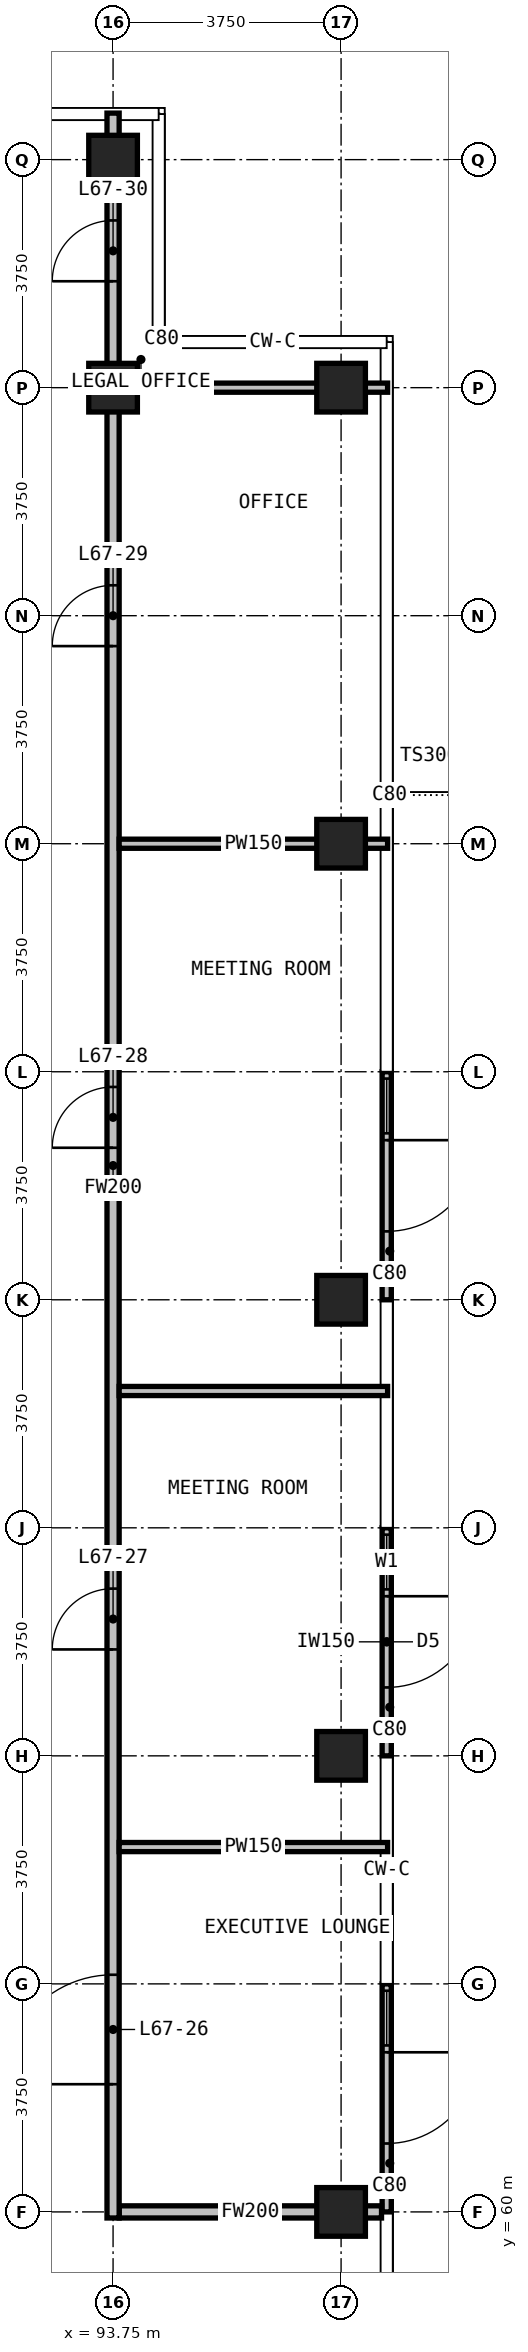
"""IFC4 building model, lengths in metres.
Left out: names, types, materials, properties, quantities, classifications, styles, units other than length and angle.
Written with IfcOpenShell. Run it as: python <this file> out.ifc"""

import sys

from ifc_helpers import new_model, si_unit, direction, frame, frame_2d, origin, origin_2d, place, context, subcontext, project, spatial, rectangle, extrude, element, fill, save


model = new_model("IFC4")
c1 = context("Model", 3, precision=1e-05, world=origin(), true_north=direction((0.0, 1.0)))
c2 = subcontext(c1, "Body", "Model", "MODEL_VIEW")
j1 = project(units=[si_unit("LENGTHUNIT", "METRE"), si_unit("PLANEANGLEUNIT", "RADIAN")], contexts=[c1])
p1 = place(None, origin())
s1 = spatial("IfcSite", under=j1, at=p1, CompositionType="ELEMENT")
p2 = place(p1, origin())
s2 = spatial("IfcBuilding", under=s1, at=p2, CompositionType="ELEMENT")
p3 = place(p2, frame((0.0, 0.0, 258.5)))
s3 = spatial("IfcBuildingStorey", under=s2, at=p3, CompositionType="ELEMENT", Elevation=258.5)
for number, where, z_axis, x_axis in (
    (1, (93.75, 90.0, 0.0), (0.0, 0.0, 1.0), (1.0, 0.0, 0.0)),
    (2, (93.75, 93.75, 0.0), (0.0, 0.0, 1.0), (1.0, 0.0, 0.0)),
    (3, (97.5, 60.0, 0.0), (0.0, 0.0, 1.0), (1.0, 0.0, 0.0)),
    (4, (97.5, 67.5, 0.0), (0.0, 0.0, 1.0), (1.0, 0.0, 0.0)),
    (5, (97.5, 75.0, 0.0), (0.0, 0.0, 1.0), (1.0, 0.0, 0.0)),
    (6, (97.5, 82.5, 0.0), (0.0, 0.0, 1.0), (1.0, 0.0, 0.0)),
    (7, (97.5, 90.0, 0.0), (0.0, 0.0, 1.0), (1.0, 0.0, 0.0)),
):
    element("IfcColumn", number, at=place(p3, frame(where, z_axis=z_axis, x_axis=x_axis)), inside=s3, PredefinedType="COLUMN", context=c2, shape_type="SweptSolid", body=[
        extrude(rectangle(XDim=0.8, YDim=0.8, at=origin_2d()), origin(), (0.0, 0.0, 1.0), 3.6),
    ])
p4 = place(p3, frame((98.25, 63.75, 0.0), z_axis=(0.0, 0.0, 1.0), x_axis=(0.0, -1.0, 0.0)))
e8 = element("IfcWall", 8, at=p4, inside=s3, PredefinedType="SOLIDWALL", context=c2, shape_type="SweptSolid", body=[
    extrude(rectangle(XDim=3.75, YDim=0.15, at=frame_2d((1.875, 0.0))), origin(), (0.0, 0.0, 1.0), 3.3),
])
p5 = place(p4, frame((0.113, 0.0, 0.1)))
e9 = element("IfcOpeningElement", 9, at=p5, cuts=e8, PredefinedType="OPENING", context=c2, shape_type="SweptSolid", body=[
    extrude(rectangle(XDim=0.9, YDim=2.4, at=frame_2d((0.45, 1.2))), frame((0.0, 0.085, 0.0), z_axis=(0.0, -1.0, 0.0), x_axis=(1.0, 0.0, 0.0)), (0.0, 0.0, 1.0), 0.17),
])
p6 = place(p4, frame((1.125, 0.0, 0.0)))
e10 = element("IfcOpeningElement", 10, at=p6, cuts=e8, PredefinedType="OPENING", context=c2, shape_type="SweptSolid", body=[
    extrude(rectangle(XDim=1.5, YDim=2.4, at=frame_2d((0.75, 1.2))), frame((0.0, 0.085, 0.0), z_axis=(0.0, -1.0, 0.0), x_axis=(1.0, 0.0, 0.0)), (0.0, 0.0, 1.0), 0.17),
])
p7 = place(p3, frame((98.25, 71.25, 0.0), z_axis=(0.0, 0.0, 1.0), x_axis=(0.0, -1.0, 0.0)))
e11 = element("IfcWall", 11, at=p7, inside=s3, PredefinedType="SOLIDWALL", context=c2, shape_type="SweptSolid", body=[
    extrude(rectangle(XDim=3.75, YDim=0.15, at=frame_2d((1.875, 0.0))), origin(), (0.0, 0.0, 1.0), 3.3),
])
p8 = place(p7, frame((0.113, 0.0, 0.1)))
e12 = element("IfcOpeningElement", 12, at=p8, cuts=e11, PredefinedType="OPENING", context=c2, shape_type="SweptSolid", body=[
    extrude(rectangle(XDim=0.9, YDim=2.4, at=frame_2d((0.45, 1.2))), frame((0.0, 0.085, 0.0), z_axis=(0.0, -1.0, 0.0), x_axis=(1.0, 0.0, 0.0)), (0.0, 0.0, 1.0), 0.17),
])
p9 = place(p7, frame((1.125, 0.0, 0.0)))
e13 = element("IfcOpeningElement", 13, at=p9, cuts=e11, PredefinedType="OPENING", context=c2, shape_type="SweptSolid", body=[
    extrude(rectangle(XDim=1.5, YDim=2.4, at=frame_2d((0.75, 1.2))), frame((0.0, 0.085, 0.0), z_axis=(0.0, -1.0, 0.0), x_axis=(1.0, 0.0, 0.0)), (0.0, 0.0, 1.0), 0.17),
])
p10 = place(p3, frame((98.25, 78.75, 0.0), z_axis=(0.0, 0.0, 1.0), x_axis=(0.0, -1.0, 0.0)))
e14 = element("IfcWall", 14, at=p10, inside=s3, PredefinedType="SOLIDWALL", context=c2, shape_type="SweptSolid", body=[
    extrude(rectangle(XDim=3.75, YDim=0.15, at=frame_2d((1.875, 0.0))), origin(), (0.0, 0.0, 1.0), 3.3),
])
p11 = place(p10, frame((0.113, 0.0, 0.1)))
e15 = element("IfcOpeningElement", 15, at=p11, cuts=e14, PredefinedType="OPENING", context=c2, shape_type="SweptSolid", body=[
    extrude(rectangle(XDim=0.9, YDim=2.4, at=frame_2d((0.45, 1.2))), frame((0.0, 0.085, 0.0), z_axis=(0.0, -1.0, 0.0), x_axis=(1.0, 0.0, 0.0)), (0.0, 0.0, 1.0), 0.17),
])
p12 = place(p10, frame((1.125, 0.0, 0.0)))
e16 = element("IfcOpeningElement", 16, at=p12, cuts=e14, PredefinedType="OPENING", context=c2, shape_type="SweptSolid", body=[
    extrude(rectangle(XDim=1.5, YDim=2.4, at=frame_2d((0.75, 1.2))), frame((0.0, 0.085, 0.0), z_axis=(0.0, -1.0, 0.0), x_axis=(1.0, 0.0, 0.0)), (0.0, 0.0, 1.0), 0.17),
])
p13 = place(p3, frame((93.85, 60.0, 0.0), z_axis=(0.0, 0.0, 1.0), x_axis=(1.0, 0.0, 0.0)))
e17 = element("IfcWall", 17, at=p13, inside=s3, PredefinedType="PARTITIONING", context=c2, shape_type="SweptSolid", body=[
    extrude(rectangle(XDim=4.315, YDim=0.2, at=frame_2d((2.157, 0.0))), origin(), (0.0, 0.0, 1.0), 3.3),
])
p14 = place(p3, frame((93.75, 59.9, 0.0), z_axis=(0.0, 0.0, 1.0), x_axis=(0.0, 1.0, 0.0)))
e18 = element("IfcWall", 18, at=p14, inside=s3, PredefinedType="PARTITIONING", context=c2, shape_type="SweptSolid", body=[
    extrude(rectangle(XDim=34.615, YDim=0.2, at=frame_2d((17.308, 0.0))), origin(), (0.0, 0.0, 1.0), 3.3),
])
p15 = place(p14, frame((2.2, 0.0, 0.0)))
e19 = element("IfcOpeningElement", 19, at=p15, cuts=e18, PredefinedType="OPENING", context=c2, shape_type="SweptSolid", body=[
    extrude(rectangle(XDim=1.8, YDim=2.2, at=frame_2d((0.9, 1.1))), frame((0.0, 0.11, 0.0), z_axis=(0.0, -1.0, 0.0), x_axis=(1.0, 0.0, 0.0)), (0.0, 0.0, 1.0), 0.22),
])
p16 = place(p14, frame((9.35, 0.0, 0.0)))
e20 = element("IfcOpeningElement", 20, at=p16, cuts=e18, PredefinedType="OPENING", context=c2, shape_type="SweptSolid", body=[
    extrude(rectangle(XDim=1.0, YDim=2.2, at=frame_2d((0.5, 1.1))), frame((0.0, 0.11, 0.0), z_axis=(0.0, -1.0, 0.0), x_axis=(1.0, 0.0, 0.0)), (0.0, 0.0, 1.0), 0.22),
])
p17 = place(p14, frame((17.6, 0.0, 0.0)))
e21 = element("IfcOpeningElement", 21, at=p17, cuts=e18, PredefinedType="OPENING", context=c2, shape_type="SweptSolid", body=[
    extrude(rectangle(XDim=1.0, YDim=2.2, at=frame_2d((0.5, 1.1))), frame((0.0, 0.11, 0.0), z_axis=(0.0, -1.0, 0.0), x_axis=(1.0, 0.0, 0.0)), (0.0, 0.0, 1.0), 0.22),
])
p18 = place(p14, frame((25.85, 0.0, 0.0)))
e22 = element("IfcOpeningElement", 22, at=p18, cuts=e18, PredefinedType="OPENING", context=c2, shape_type="SweptSolid", body=[
    extrude(rectangle(XDim=1.0, YDim=2.2, at=frame_2d((0.5, 1.1))), frame((0.0, 0.11, 0.0), z_axis=(0.0, -1.0, 0.0), x_axis=(1.0, 0.0, 0.0)), (0.0, 0.0, 1.0), 0.22),
])
p19 = place(p14, frame((31.85, 0.0, 0.0)))
e23 = element("IfcOpeningElement", 23, at=p19, cuts=e18, PredefinedType="OPENING", context=c2, shape_type="SweptSolid", body=[
    extrude(rectangle(XDim=1.0, YDim=2.2, at=frame_2d((0.5, 1.1))), frame((0.0, 0.11, 0.0), z_axis=(0.0, -1.0, 0.0), x_axis=(1.0, 0.0, 0.0)), (0.0, 0.0, 1.0), 0.22),
])
for number, where, z_axis, x_axis in (
    (24, (93.85, 66.0, 0.0), (0.0, 0.0, 1.0), (1.0, 0.0, 0.0)),
    (25, (93.85, 73.5, 0.0), (0.0, 0.0, 1.0), (1.0, 0.0, 0.0)),
    (26, (93.85, 82.5, 0.0), (0.0, 0.0, 1.0), (1.0, 0.0, 0.0)),
    (27, (93.85, 90.0, 0.0), (0.0, 0.0, 1.0), (1.0, 0.0, 0.0)),
):
    element("IfcWall", number, at=place(p3, frame(where, z_axis=z_axis, x_axis=x_axis)), inside=s3, PredefinedType="PARTITIONING", context=c2, shape_type="SweptSolid", body=[
        extrude(rectangle(XDim=4.415, YDim=0.15, at=frame_2d((2.208, 0.0))), origin(), (0.0, 0.0, 1.0), 3.3),
    ])
p20 = place(p5, origin())
e28 = element("IfcWindow", 28, at=p20, inside=s3, PartitioningType="SINGLE_PANEL", PredefinedType="WINDOW", context=c2, shape_type="SweptSolid", body=[
    extrude(rectangle(XDim=0.9, YDim=2.4, at=frame_2d((0.45, 1.2))), frame((0.0, 0.03, 0.0), z_axis=(0.0, -1.0, 0.0), x_axis=(1.0, 0.0, 0.0)), (0.0, 0.0, 1.0), 0.06),
])
fill(e9, e28)
p21 = place(p6, origin())
e29 = element("IfcDoor", 29, at=p21, inside=s3, OperationType="DOUBLE_DOOR_SINGLE_SWING", PredefinedType="DOOR", context=c2, shape_type="SweptSolid", body=[
    extrude(rectangle(XDim=1.5, YDim=2.4, at=frame_2d((0.75, 1.2))), frame((0.0, 0.025, 0.0), z_axis=(0.0, -1.0, 0.0), x_axis=(1.0, 0.0, 0.0)), (0.0, 0.0, 1.0), 0.05),
])
fill(e10, e29)
p22 = place(p8, origin())
e30 = element("IfcWindow", 30, at=p22, inside=s3, PartitioningType="SINGLE_PANEL", PredefinedType="WINDOW", context=c2, shape_type="SweptSolid", body=[
    extrude(rectangle(XDim=0.9, YDim=2.4, at=frame_2d((0.45, 1.2))), frame((0.0, 0.03, 0.0), z_axis=(0.0, -1.0, 0.0), x_axis=(1.0, 0.0, 0.0)), (0.0, 0.0, 1.0), 0.06),
])
fill(e12, e30)
p23 = place(p9, origin())
e31 = element("IfcDoor", 31, at=p23, inside=s3, OperationType="DOUBLE_DOOR_SINGLE_SWING", PredefinedType="DOOR", context=c2, shape_type="SweptSolid", body=[
    extrude(rectangle(XDim=1.5, YDim=2.4, at=frame_2d((0.75, 1.2))), frame((0.0, 0.025, 0.0), z_axis=(0.0, -1.0, 0.0), x_axis=(1.0, 0.0, 0.0)), (0.0, 0.0, 1.0), 0.05),
])
fill(e13, e31)
p24 = place(p11, origin())
e32 = element("IfcWindow", 32, at=p24, inside=s3, PartitioningType="SINGLE_PANEL", PredefinedType="WINDOW", context=c2, shape_type="SweptSolid", body=[
    extrude(rectangle(XDim=0.9, YDim=2.4, at=frame_2d((0.45, 1.2))), frame((0.0, 0.03, 0.0), z_axis=(0.0, -1.0, 0.0), x_axis=(1.0, 0.0, 0.0)), (0.0, 0.0, 1.0), 0.06),
])
fill(e15, e32)
p25 = place(p12, origin())
e33 = element("IfcDoor", 33, at=p25, inside=s3, OperationType="DOUBLE_DOOR_SINGLE_SWING", PredefinedType="DOOR", context=c2, shape_type="SweptSolid", body=[
    extrude(rectangle(XDim=1.5, YDim=2.4, at=frame_2d((0.75, 1.2))), frame((0.0, 0.025, 0.0), z_axis=(0.0, -1.0, 0.0), x_axis=(1.0, 0.0, 0.0)), (0.0, 0.0, 1.0), 0.05),
])
fill(e16, e33)
p26 = place(p15, origin())
e34 = element("IfcDoor", 34, at=p26, inside=s3, OperationType="DOUBLE_DOOR_SINGLE_SWING", PredefinedType="DOOR", context=c2, shape_type="SweptSolid", body=[
    extrude(rectangle(XDim=1.8, YDim=2.2, at=frame_2d((0.9, 1.1))), frame((0.0, 0.025, 0.0), z_axis=(0.0, -1.0, 0.0), x_axis=(1.0, 0.0, 0.0)), (0.0, 0.0, 1.0), 0.05),
])
fill(e19, e34)
p27 = place(p16, origin())
e35 = element("IfcDoor", 35, at=p27, inside=s3, OperationType="SINGLE_SWING_LEFT", PredefinedType="DOOR", context=c2, shape_type="SweptSolid", body=[
    extrude(rectangle(XDim=1.0, YDim=2.2, at=frame_2d((0.5, 1.1))), frame((0.0, 0.025, 0.0), z_axis=(0.0, -1.0, 0.0), x_axis=(1.0, 0.0, 0.0)), (0.0, 0.0, 1.0), 0.05),
])
fill(e20, e35)
p28 = place(p17, origin())
e36 = element("IfcDoor", 36, at=p28, inside=s3, OperationType="SINGLE_SWING_LEFT", PredefinedType="DOOR", context=c2, shape_type="SweptSolid", body=[
    extrude(rectangle(XDim=1.0, YDim=2.2, at=frame_2d((0.5, 1.1))), frame((0.0, 0.025, 0.0), z_axis=(0.0, -1.0, 0.0), x_axis=(1.0, 0.0, 0.0)), (0.0, 0.0, 1.0), 0.05),
])
fill(e21, e36)
p29 = place(p18, origin())
e37 = element("IfcDoor", 37, at=p29, inside=s3, OperationType="SINGLE_SWING_LEFT", PredefinedType="DOOR", context=c2, shape_type="SweptSolid", body=[
    extrude(rectangle(XDim=1.0, YDim=2.2, at=frame_2d((0.5, 1.1))), frame((0.0, 0.025, 0.0), z_axis=(0.0, -1.0, 0.0), x_axis=(1.0, 0.0, 0.0)), (0.0, 0.0, 1.0), 0.05),
])
fill(e22, e37)
p30 = place(p19, origin())
e38 = element("IfcDoor", 38, at=p30, inside=s3, OperationType="SINGLE_SWING_LEFT", PredefinedType="DOOR", context=c2, shape_type="SweptSolid", body=[
    extrude(rectangle(XDim=1.0, YDim=2.2, at=frame_2d((0.5, 1.1))), frame((0.0, 0.025, 0.0), z_axis=(0.0, -1.0, 0.0), x_axis=(1.0, 0.0, 0.0)), (0.0, 0.0, 1.0), 0.05),
])
fill(e23, e38)
save(model, sys.argv[1])
